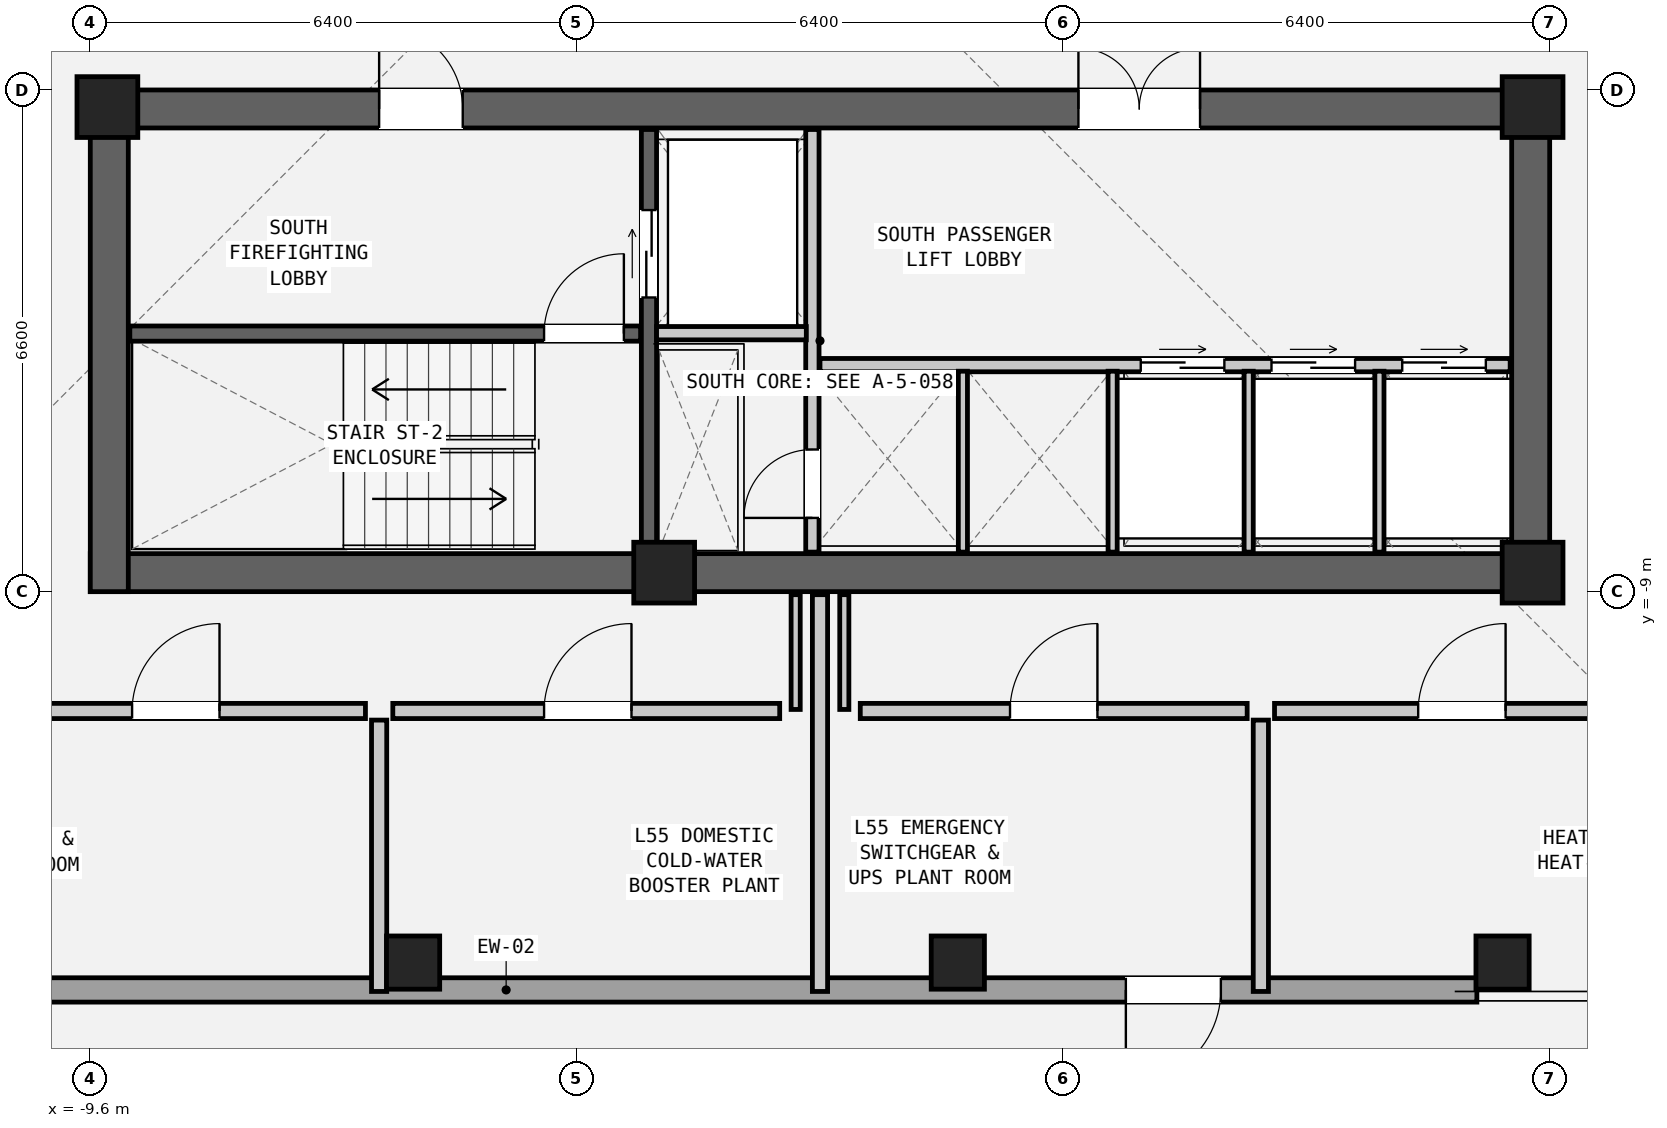
"""IFC4 building model, lengths in metres.
Left out: names, types, materials, properties, quantities, classifications, styles, units other than length and angle.
Written with IfcOpenShell. Run it as: python <this file> out.ifc"""

import sys

from ifc_helpers import new_model, si_unit, direction, frame, frame_2d, origin, origin_2d, place, context, subcontext, project, spatial, rectangle, hollow_rectangle, extrude, element, fill, save


model = new_model("IFC4")
c1 = context("Model", 3, precision=1e-05, world=origin(), true_north=direction((0.0, 1.0)))
c2 = subcontext(c1, "Body", "Model", "MODEL_VIEW")
j1 = project(units=[si_unit("LENGTHUNIT", "METRE"), si_unit("PLANEANGLEUNIT", "RADIAN")], contexts=[c1])
p1 = place(None, origin())
s1 = spatial("IfcSite", under=j1, at=p1, CompositionType="ELEMENT")
p2 = place(p1, origin())
s2 = spatial("IfcBuilding", under=s1, at=p2, CompositionType="ELEMENT")
p3 = place(p2, frame((0.0, 0.0, 187.95)))
s3 = spatial("IfcBuildingStorey", under=s2, at=p3, CompositionType="ELEMENT", Elevation=187.95)
p4 = place(p3, frame((-9.6, -8.75, 0.0), z_axis=(0.0, 0.0, 1.0), x_axis=(1.0, 0.0, 0.0)))
e1 = element("IfcWall", 1, at=p4, inside=s3, PredefinedType="SHEAR", context=c2, shape_type="SweptSolid", body=[
    extrude(rectangle(XDim=19.2, YDim=0.5, at=frame_2d((9.6, 0.0))), origin(), (0.0, 0.0, 1.0), 3.6),
])
p5 = place(p3, frame((-9.6, -2.65, 0.0), z_axis=(0.0, 0.0, 1.0), x_axis=(1.0, 0.0, 0.0)))
e2 = element("IfcWall", 2, at=p5, inside=s3, PredefinedType="SHEAR", context=c2, shape_type="SweptSolid", body=[
    extrude(rectangle(XDim=19.2, YDim=0.5, at=frame_2d((9.6, 0.0))), origin(), (0.0, 0.0, 1.0), 3.6),
])
p6 = place(p5, frame((3.8, 0.0, 0.0)))
e3 = element("IfcOpeningElement", 3, at=p6, cuts=e2, PredefinedType="OPENING", context=c2, shape_type="SweptSolid", body=[
    extrude(rectangle(XDim=1.1, YDim=2.08, at=frame_2d((0.55, 1.04))), frame((0.0, 0.262, 0.0), z_axis=(0.0, -1.0, 0.0), x_axis=(1.0, 0.0, 0.0)), (0.0, 0.0, 1.0), 0.524),
])
p7 = place(p5, frame((13.0, 0.0, 0.0)))
e4 = element("IfcOpeningElement", 4, at=p7, cuts=e2, PredefinedType="OPENING", context=c2, shape_type="SweptSolid", body=[
    extrude(rectangle(XDim=1.6, YDim=2.12, at=frame_2d((0.8, 1.06))), frame((0.0, 0.262, 0.0), z_axis=(0.0, -1.0, 0.0), x_axis=(1.0, 0.0, 0.0)), (0.0, 0.0, 1.0), 0.524),
])
for number, where, z_axis, x_axis in (
    (5, (-9.35, -9.0, 0.0), (0.0, 0.0, 1.0), (0.0, 1.0, 0.0)),
    (6, (9.35, -9.0, 0.0), (0.0, 0.0, 1.0), (0.0, 1.0, 0.0)),
):
    element("IfcWall", number, at=place(p3, frame(where, z_axis=z_axis, x_axis=x_axis)), inside=s3, PredefinedType="SHEAR", context=c2, shape_type="SweptSolid", body=[
        extrude(rectangle(XDim=6.6, YDim=0.5, at=frame_2d((3.3, 0.0))), origin(), (0.0, 0.0, 1.0), 3.6),
    ])
for number, where, z_axis, x_axis in (
    (7, (-5.353, -13.88, 0.0), (0.0, 0.0, 1.0), (1.0, 0.0, 0.0)),
    (8, (1.813, -13.88, 0.0), (0.0, 0.0, 1.0), (1.0, 0.0, 0.0)),
    (9, (8.98, -13.88, 0.0), (0.0, 0.0, 1.0), (1.0, 0.0, 0.0)),
):
    element("IfcColumn", number, at=place(p3, frame(where, z_axis=z_axis, x_axis=x_axis)), inside=s3, PredefinedType="COLUMN", context=c2, shape_type="SweptSolid", body=[
        extrude(hollow_rectangle(XDim=0.7, YDim=0.7, WallThickness=0.045, at=origin_2d()), origin(), (0.0, 0.0, 1.0), 3.6),
    ])
for number, where, z_axis, x_axis in (
    (10, (-9.375, -2.625, 0.0), (0.0, 0.0, 1.0), (1.0, 0.0, 0.0)),
    (11, (9.375, -2.625, 0.0), (0.0, 0.0, 1.0), (1.0, 0.0, 0.0)),
    (12, (-2.05, -8.75, 0.0), (0.0, 0.0, 1.0), (1.0, 0.0, 0.0)),
    (13, (9.375, -8.75, 0.0), (0.0, 0.0, 1.0), (1.0, 0.0, 0.0)),
):
    element("IfcColumn", number, at=place(p3, frame(where, z_axis=z_axis, x_axis=x_axis)), inside=s3, PredefinedType="COLUMN", context=c2, shape_type="SweptSolid", body=[
        extrude(rectangle(XDim=0.8, YDim=0.8, at=origin_2d()), origin(), (0.0, 0.0, 1.0), 3.6),
    ])
p8 = place(p3, frame((8.642, -14.24, 0.0), z_axis=(0.0, 0.0, 1.0), x_axis=(-1.0, 0.0, 0.0)))
e14 = element("IfcWall", 14, at=p8, inside=s3, PredefinedType="SOLIDWALL", context=c2, shape_type="SweptSolid", body=[
    extrude(rectangle(XDim=20.824, YDim=0.32, at=frame_2d((10.412, 0.0))), origin(), (0.0, 0.0, 1.0), 2.182),
])
p9 = place(p8, frame((3.368, 0.0, 0.0)))
e15 = element("IfcOpeningElement", 15, at=p9, cuts=e14, PredefinedType="OPENING", context=c2, shape_type="SweptSolid", body=[
    extrude(rectangle(XDim=1.25, YDim=2.02, at=frame_2d((0.625, 1.01))), frame((0.0, 0.172, 0.0), z_axis=(0.0, -1.0, 0.0), x_axis=(1.0, 0.0, 0.0)), (0.0, 0.0, 1.0), 0.344),
])
p10 = place(p3, frame((-9.08, -5.605, 0.0), z_axis=(0.0, 0.0, 1.0), x_axis=(1.0, 0.0, 0.0)))
e16 = element("IfcWall", 16, at=p10, inside=s3, PredefinedType="SHEAR", context=c2, shape_type="SweptSolid", body=[
    extrude(rectangle(XDim=6.72, YDim=0.2, at=frame_2d((3.36, 0.0))), origin(), (0.0, 0.0, 1.0), 3.32),
])
p11 = place(p10, frame((5.45, 0.0, 0.0)))
e17 = element("IfcOpeningElement", 17, at=p11, cuts=e16, PredefinedType="OPENING", context=c2, shape_type="SweptSolid", body=[
    extrude(rectangle(XDim=1.05, YDim=2.08, at=frame_2d((0.525, 1.04))), frame((0.0, 0.112, 0.0), z_axis=(0.0, -1.0, 0.0), x_axis=(1.0, 0.0, 0.0)), (0.0, 0.0, 1.0), 0.224),
])
p12 = place(p3, frame((-2.25, -8.48, 0.0), z_axis=(0.0, 0.0, 1.0), x_axis=(0.0, 1.0, 0.0)))
e18 = element("IfcWall", 18, at=p12, inside=s3, PredefinedType="SHEAR", context=c2, shape_type="SweptSolid", body=[
    extrude(rectangle(XDim=5.56, YDim=0.2, at=frame_2d((2.78, 0.0))), origin(), (0.0, 0.0, 1.0), 3.32),
])
p13 = place(p12, frame((3.35, 0.0, 0.0)))
e19 = element("IfcOpeningElement", 19, at=p13, cuts=e18, PredefinedType="OPENING", context=c2, shape_type="SweptSolid", body=[
    extrude(rectangle(XDim=1.15, YDim=2.08, at=frame_2d((0.575, 1.04))), frame((0.0, 0.112, 0.0), z_axis=(0.0, -1.0, 0.0), x_axis=(1.0, 0.0, 0.0)), (0.0, 0.0, 1.0), 0.224),
])
p14 = place(p3, frame((-0.1, -8.48, 0.0), z_axis=(0.0, 0.0, 1.0), x_axis=(0.0, 1.0, 0.0)))
e20 = element("IfcWall", 20, at=p14, inside=s3, PredefinedType="PARTITIONING", context=c2, shape_type="SweptSolid", body=[
    extrude(rectangle(XDim=5.56, YDim=0.175, at=frame_2d((2.78, 0.0))), origin(), (0.0, 0.0, 1.0), 3.32),
])
p15 = place(p14, frame((0.45, 0.0, 0.0)))
e21 = element("IfcOpeningElement", 21, at=p15, cuts=e20, PredefinedType="OPENING", context=c2, shape_type="SweptSolid", body=[
    extrude(rectangle(XDim=0.9, YDim=2.05, at=frame_2d((0.45, 1.025))), frame((0.0, 0.1, 0.0), z_axis=(0.0, -1.0, 0.0), x_axis=(1.0, 0.0, 0.0)), (0.0, 0.0, 1.0), 0.199),
])
p16 = place(p3, frame((-2.15, -5.6, 0.0), z_axis=(0.0, 0.0, 1.0), x_axis=(1.0, 0.0, 0.0)))
e22 = element("IfcWall", 22, at=p16, inside=s3, PredefinedType="PARTITIONING", context=c2, shape_type="SweptSolid", body=[
    extrude(rectangle(XDim=1.97, YDim=0.175, at=frame_2d((0.985, 0.0))), origin(), (0.0, 0.0, 1.0), 3.32),
])
p17 = place(p3, frame((0.0, -6.02, 0.0), z_axis=(0.0, 0.0, 1.0), x_axis=(1.0, 0.0, 0.0)))
e23 = element("IfcWall", 23, at=p17, inside=s3, PredefinedType="PARTITIONING", context=c2, shape_type="SweptSolid", body=[
    extrude(rectangle(XDim=9.08, YDim=0.175, at=frame_2d((4.54, 0.0))), origin(), (0.0, 0.0, 1.0), 3.32),
])
p18 = place(p17, frame((4.22, 0.0, 0.0)))
e24 = element("IfcOpeningElement", 24, at=p18, cuts=e23, PredefinedType="OPENING", context=c2, shape_type="SweptSolid", body=[
    extrude(rectangle(XDim=1.1, YDim=2.06, at=frame_2d((0.55, 1.03))), frame((0.0, 0.1, 0.0), z_axis=(0.0, -1.0, 0.0), x_axis=(1.0, 0.0, 0.0)), (0.0, 0.0, 1.0), 0.199),
])
p19 = place(p17, frame((5.94, 0.0, 0.0)))
e25 = element("IfcOpeningElement", 25, at=p19, cuts=e23, PredefinedType="OPENING", context=c2, shape_type="SweptSolid", body=[
    extrude(rectangle(XDim=1.1, YDim=2.06, at=frame_2d((0.55, 1.03))), frame((0.0, 0.1, 0.0), z_axis=(0.0, -1.0, 0.0), x_axis=(1.0, 0.0, 0.0)), (0.0, 0.0, 1.0), 0.199),
])
p20 = place(p17, frame((7.66, 0.0, 0.0)))
e26 = element("IfcOpeningElement", 26, at=p20, cuts=e23, PredefinedType="OPENING", context=c2, shape_type="SweptSolid", body=[
    extrude(rectangle(XDim=1.1, YDim=2.06, at=frame_2d((0.55, 1.03))), frame((0.0, 0.1, 0.0), z_axis=(0.0, -1.0, 0.0), x_axis=(1.0, 0.0, 0.0)), (0.0, 0.0, 1.0), 0.199),
])
for number, where, z_axis, x_axis in (
    (27, (1.88, -8.48, 0.0), (0.0, 0.0, 1.0), (0.0, 1.0, 0.0)),
    (28, (3.85, -8.48, 0.0), (0.0, 0.0, 1.0), (0.0, 1.0, 0.0)),
    (29, (5.64, -8.48, 0.0), (0.0, 0.0, 1.0), (0.0, 1.0, 0.0)),
    (30, (7.36, -8.48, 0.0), (0.0, 0.0, 1.0), (0.0, 1.0, 0.0)),
):
    element("IfcWall", number, at=place(p3, frame(where, z_axis=z_axis, x_axis=x_axis)), inside=s3, PredefinedType="PARTITIONING", context=c2, shape_type="SweptSolid", body=[
        extrude(rectangle(XDim=2.38, YDim=0.12, at=frame_2d((1.19, 0.0))), origin(), (0.0, 0.0, 1.0), 3.32),
    ])
p21 = place(p3, frame((0.0, -14.26, 0.0), z_axis=(0.0, 0.0, 1.0), x_axis=(0.0, 1.0, 0.0)))
e31 = element("IfcWall", 31, at=p21, inside=s3, PredefinedType="PARTITIONING", context=c2, shape_type="SweptSolid", body=[
    extrude(rectangle(XDim=5.22, YDim=0.2, at=frame_2d((2.61, 0.0))), origin(), (0.0, 0.0, 1.0), 2.538),
])
for number, where, z_axis, x_axis in (
    (32, (-0.32, -10.55, 0.0), (0.0, 0.0, 1.0), (0.0, 1.0, 0.0)),
    (33, (0.32, -10.55, 0.0), (0.0, 0.0, 1.0), (0.0, 1.0, 0.0)),
):
    element("IfcWall", number, at=place(p3, frame(where, z_axis=z_axis, x_axis=x_axis)), inside=s3, PredefinedType="PARTITIONING", context=c2, shape_type="SweptSolid", body=[
        extrude(rectangle(XDim=1.51, YDim=0.12, at=frame_2d((0.755, 0.0))), origin(), (0.0, 0.0, 1.0), 2.538),
    ])
p22 = place(p3, frame((-10.97, -10.57, 0.0), z_axis=(0.0, 0.0, 1.0), x_axis=(1.0, 0.0, 0.0)))
e34 = element("IfcWall", 34, at=p22, inside=s3, PredefinedType="PARTITIONING", context=c2, shape_type="SweptSolid", body=[
    extrude(rectangle(XDim=4.99, YDim=0.2, at=frame_2d((2.495, 0.0))), origin(), (0.0, 0.0, 1.0), 3.32),
])
p23 = place(p22, frame((1.92, 0.0, 0.0)))
e35 = element("IfcOpeningElement", 35, at=p23, cuts=e34, PredefinedType="OPENING", context=c2, shape_type="SweptSolid", body=[
    extrude(rectangle(XDim=1.15, YDim=2.1, at=frame_2d((0.575, 1.05))), frame((0.0, 0.112, 0.0), z_axis=(0.0, -1.0, 0.0), x_axis=(1.0, 0.0, 0.0)), (0.0, 0.0, 1.0), 0.224),
])
p24 = place(p3, frame((-5.8, -14.26, 0.0), z_axis=(0.0, 0.0, 1.0), x_axis=(0.0, 1.0, 0.0)))
e36 = element("IfcWall", 36, at=p24, inside=s3, PredefinedType="PARTITIONING", context=c2, shape_type="SweptSolid", body=[
    extrude(rectangle(XDim=3.57, YDim=0.2, at=frame_2d((1.785, 0.0))), origin(), (0.0, 0.0, 1.0), 2.538),
])
p25 = place(p3, frame((-5.62, -10.57, 0.0), z_axis=(0.0, 0.0, 1.0), x_axis=(1.0, 0.0, 0.0)))
e37 = element("IfcWall", 37, at=p25, inside=s3, PredefinedType="PARTITIONING", context=c2, shape_type="SweptSolid", body=[
    extrude(rectangle(XDim=5.09, YDim=0.2, at=frame_2d((2.545, 0.0))), origin(), (0.0, 0.0, 1.0), 3.32),
])
p26 = place(p25, frame((1.99, 0.0, 0.0)))
e38 = element("IfcOpeningElement", 38, at=p26, cuts=e37, PredefinedType="OPENING", context=c2, shape_type="SweptSolid", body=[
    extrude(rectangle(XDim=1.15, YDim=2.1, at=frame_2d((0.575, 1.05))), frame((0.0, 0.112, 0.0), z_axis=(0.0, -1.0, 0.0), x_axis=(1.0, 0.0, 0.0)), (0.0, 0.0, 1.0), 0.224),
])
p27 = place(p3, frame((0.53, -10.57, 0.0), z_axis=(0.0, 0.0, 1.0), x_axis=(1.0, 0.0, 0.0)))
e39 = element("IfcWall", 39, at=p27, inside=s3, PredefinedType="PARTITIONING", context=c2, shape_type="SweptSolid", body=[
    extrude(rectangle(XDim=5.09, YDim=0.2, at=frame_2d((2.545, 0.0))), origin(), (0.0, 0.0, 1.0), 3.32),
])
p28 = place(p27, frame((1.97, 0.0, 0.0)))
e40 = element("IfcOpeningElement", 40, at=p28, cuts=e39, PredefinedType="OPENING", context=c2, shape_type="SweptSolid", body=[
    extrude(rectangle(XDim=1.15, YDim=2.1, at=frame_2d((0.575, 1.05))), frame((0.0, 0.112, 0.0), z_axis=(0.0, -1.0, 0.0), x_axis=(1.0, 0.0, 0.0)), (0.0, 0.0, 1.0), 0.224),
])
p29 = place(p3, frame((5.8, -14.26, 0.0), z_axis=(0.0, 0.0, 1.0), x_axis=(0.0, 1.0, 0.0)))
e41 = element("IfcWall", 41, at=p29, inside=s3, PredefinedType="PARTITIONING", context=c2, shape_type="SweptSolid", body=[
    extrude(rectangle(XDim=3.57, YDim=0.2, at=frame_2d((1.785, 0.0))), origin(), (0.0, 0.0, 1.0), 2.538),
])
p30 = place(p3, frame((5.98, -10.57, 0.0), z_axis=(0.0, 0.0, 1.0), x_axis=(1.0, 0.0, 0.0)))
e42 = element("IfcWall", 42, at=p30, inside=s3, PredefinedType="PARTITIONING", context=c2, shape_type="SweptSolid", body=[
    extrude(rectangle(XDim=4.99, YDim=0.2, at=frame_2d((2.495, 0.0))), origin(), (0.0, 0.0, 1.0), 3.32),
])
p31 = place(p30, frame((1.89, 0.0, 0.0)))
e43 = element("IfcOpeningElement", 43, at=p31, cuts=e42, PredefinedType="OPENING", context=c2, shape_type="SweptSolid", body=[
    extrude(rectangle(XDim=1.15, YDim=2.1, at=frame_2d((0.575, 1.05))), frame((0.0, 0.112, 0.0), z_axis=(0.0, -1.0, 0.0), x_axis=(1.0, 0.0, 0.0)), (0.0, 0.0, 1.0), 0.224),
])
p32 = place(p9, origin())
e44 = element("IfcDoor", 44, at=p32, inside=s3, OperationType="SINGLE_SWING_RIGHT", PredefinedType="DOOR", context=c2, shape_type="SweptSolid", body=[
    extrude(rectangle(XDim=1.25, YDim=2.02, at=frame_2d((0.625, 1.01))), frame((0.0, 0.025, 0.0), z_axis=(0.0, -1.0, 0.0), x_axis=(1.0, 0.0, 0.0)), (0.0, 0.0, 1.0), 0.05),
])
fill(e15, e44)
p33 = place(p11, origin())
e45 = element("IfcDoor", 45, at=p33, inside=s3, OperationType="SINGLE_SWING_RIGHT", PredefinedType="DOOR", context=c2, shape_type="SweptSolid", body=[
    extrude(rectangle(XDim=1.05, YDim=2.08, at=frame_2d((0.525, 1.04))), frame((0.0, 0.025, 0.0), z_axis=(0.0, -1.0, 0.0), x_axis=(1.0, 0.0, 0.0)), (0.0, 0.0, 1.0), 0.05),
])
fill(e17, e45)
p34 = place(p6, origin())
e46 = element("IfcDoor", 46, at=p34, inside=s3, OperationType="SINGLE_SWING_LEFT", PredefinedType="DOOR", context=c2, shape_type="SweptSolid", body=[
    extrude(rectangle(XDim=1.1, YDim=2.08, at=frame_2d((0.55, 1.04))), frame((0.0, 0.025, 0.0), z_axis=(0.0, -1.0, 0.0), x_axis=(1.0, 0.0, 0.0)), (0.0, 0.0, 1.0), 0.05),
])
fill(e3, e46)
p35 = place(p13, origin())
e47 = element("IfcDoor", 47, at=p35, inside=s3, OperationType="DOUBLE_DOOR_SLIDING", PredefinedType="DOOR", context=c2, shape_type="SweptSolid", body=[
    extrude(rectangle(XDim=1.15, YDim=2.08, at=frame_2d((0.575, 1.04))), frame((0.0, 0.025, 0.0), z_axis=(0.0, -1.0, 0.0), x_axis=(1.0, 0.0, 0.0)), (0.0, 0.0, 1.0), 0.05),
])
fill(e19, e47)
p36 = place(p15, origin())
e48 = element("IfcDoor", 48, at=p36, inside=s3, OperationType="SINGLE_SWING_LEFT", PredefinedType="DOOR", context=c2, shape_type="SweptSolid", body=[
    extrude(rectangle(XDim=0.9, YDim=2.05, at=frame_2d((0.45, 1.025))), frame((0.0, 0.025, 0.0), z_axis=(0.0, -1.0, 0.0), x_axis=(1.0, 0.0, 0.0)), (0.0, 0.0, 1.0), 0.05),
])
fill(e21, e48)
p37 = place(p7, origin())
e49 = element("IfcDoor", 49, at=p37, inside=s3, OperationType="DOUBLE_DOOR_SINGLE_SWING", PredefinedType="DOOR", context=c2, shape_type="SweptSolid", body=[
    extrude(rectangle(XDim=1.6, YDim=2.12, at=frame_2d((0.8, 1.06))), frame((0.0, 0.025, 0.0), z_axis=(0.0, -1.0, 0.0), x_axis=(1.0, 0.0, 0.0)), (0.0, 0.0, 1.0), 0.05),
])
fill(e4, e49)
p38 = place(p23, origin())
e50 = element("IfcDoor", 50, at=p38, inside=s3, OperationType="SINGLE_SWING_RIGHT", PredefinedType="DOOR", context=c2, shape_type="SweptSolid", body=[
    extrude(rectangle(XDim=1.15, YDim=2.1, at=frame_2d((0.575, 1.05))), frame((0.0, 0.025, 0.0), z_axis=(0.0, -1.0, 0.0), x_axis=(1.0, 0.0, 0.0)), (0.0, 0.0, 1.0), 0.05),
])
fill(e35, e50)
p39 = place(p26, origin())
e51 = element("IfcDoor", 51, at=p39, inside=s3, OperationType="SINGLE_SWING_RIGHT", PredefinedType="DOOR", context=c2, shape_type="SweptSolid", body=[
    extrude(rectangle(XDim=1.15, YDim=2.1, at=frame_2d((0.575, 1.05))), frame((0.0, 0.025, 0.0), z_axis=(0.0, -1.0, 0.0), x_axis=(1.0, 0.0, 0.0)), (0.0, 0.0, 1.0), 0.05),
])
fill(e38, e51)
p40 = place(p28, origin())
e52 = element("IfcDoor", 52, at=p40, inside=s3, OperationType="SINGLE_SWING_RIGHT", PredefinedType="DOOR", context=c2, shape_type="SweptSolid", body=[
    extrude(rectangle(XDim=1.15, YDim=2.1, at=frame_2d((0.575, 1.05))), frame((0.0, 0.025, 0.0), z_axis=(0.0, -1.0, 0.0), x_axis=(1.0, 0.0, 0.0)), (0.0, 0.0, 1.0), 0.05),
])
fill(e40, e52)
p41 = place(p31, origin())
e53 = element("IfcDoor", 53, at=p41, inside=s3, OperationType="SINGLE_SWING_RIGHT", PredefinedType="DOOR", context=c2, shape_type="SweptSolid", body=[
    extrude(rectangle(XDim=1.15, YDim=2.1, at=frame_2d((0.575, 1.05))), frame((0.0, 0.025, 0.0), z_axis=(0.0, -1.0, 0.0), x_axis=(1.0, 0.0, 0.0)), (0.0, 0.0, 1.0), 0.05),
])
fill(e43, e53)
p42 = place(p18, origin())
e54 = element("IfcDoor", 54, at=p42, inside=s3, OperationType="DOUBLE_DOOR_SLIDING", PredefinedType="DOOR", context=c2, shape_type="SweptSolid", body=[
    extrude(rectangle(XDim=1.1, YDim=2.06, at=frame_2d((0.55, 1.03))), frame((0.0, 0.025, 0.0), z_axis=(0.0, -1.0, 0.0), x_axis=(1.0, 0.0, 0.0)), (0.0, 0.0, 1.0), 0.05),
])
fill(e24, e54)
p43 = place(p19, origin())
e55 = element("IfcDoor", 55, at=p43, inside=s3, OperationType="DOUBLE_DOOR_SLIDING", PredefinedType="DOOR", context=c2, shape_type="SweptSolid", body=[
    extrude(rectangle(XDim=1.1, YDim=2.06, at=frame_2d((0.55, 1.03))), frame((0.0, 0.025, 0.0), z_axis=(0.0, -1.0, 0.0), x_axis=(1.0, 0.0, 0.0)), (0.0, 0.0, 1.0), 0.05),
])
fill(e25, e55)
p44 = place(p20, origin())
e56 = element("IfcDoor", 56, at=p44, inside=s3, OperationType="DOUBLE_DOOR_SLIDING", PredefinedType="DOOR", context=c2, shape_type="SweptSolid", body=[
    extrude(rectangle(XDim=1.1, YDim=2.06, at=frame_2d((0.55, 1.03))), frame((0.0, 0.025, 0.0), z_axis=(0.0, -1.0, 0.0), x_axis=(1.0, 0.0, 0.0)), (0.0, 0.0, 1.0), 0.05),
])
fill(e26, e56)
save(model, sys.argv[1])
